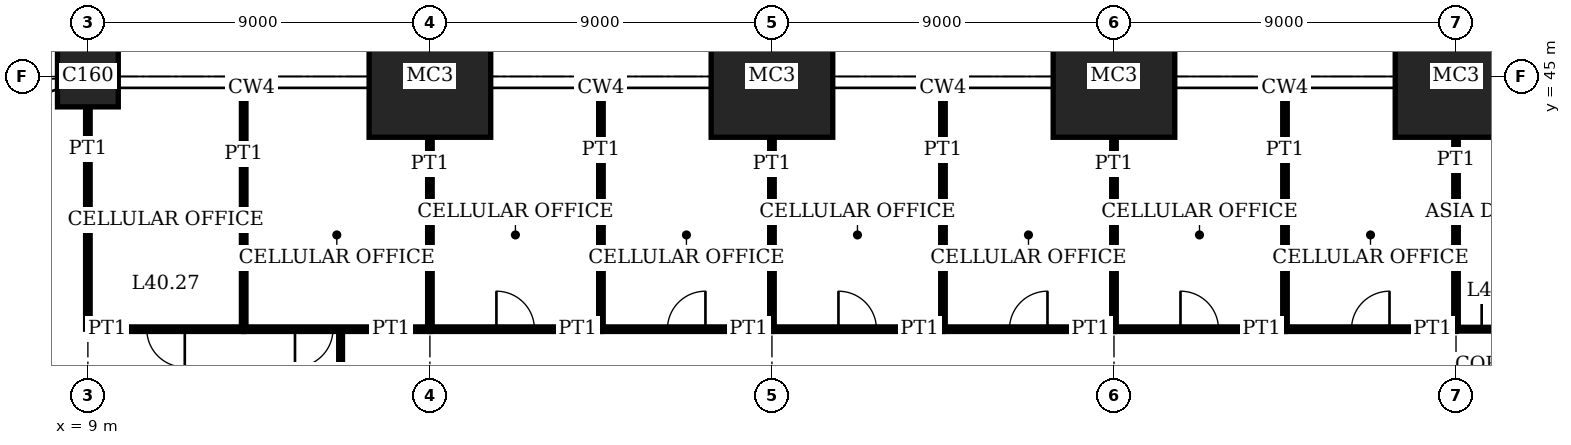
"""IFC4 building model, lengths in metres.
Left out: names, types, materials, properties, quantities, classifications, styles, units other than length and angle.
Written with IfcOpenShell. Run it as: python <this file> out.ifc"""

import sys

from ifc_helpers import new_model, si_unit, direction, frame, frame_2d, origin, origin_2d, place, context, subcontext, project, spatial, rectangle, extrude, element, fill, save


model = new_model("IFC4")
c1 = context("Model", 3, precision=1e-05, world=origin(), true_north=direction((0.0, 1.0)))
c2 = subcontext(c1, "Body", "Model", "MODEL_VIEW")
j1 = project(units=[si_unit("LENGTHUNIT", "METRE"), si_unit("PLANEANGLEUNIT", "RADIAN")], contexts=[c1])
p1 = place(None, origin())
s1 = spatial("IfcSite", under=j1, at=p1, CompositionType="ELEMENT")
p2 = place(p1, origin())
s2 = spatial("IfcBuilding", under=s1, at=p2, CompositionType="ELEMENT")
p3 = place(p2, frame((0.0, 0.0, 166.2)))
s3 = spatial("IfcBuildingStorey", under=s2, at=p3, CompositionType="ELEMENT", Elevation=166.2)
p4 = place(p3, frame((9.0, 45.0, 0.0), z_axis=(0.0, 0.0, 1.0), x_axis=(1.0, 0.0, 0.0)))
e1 = element("IfcColumn", 1, at=p4, inside=s3, PredefinedType="COLUMN", context=c2, shape_type="SweptSolid", body=[
    extrude(rectangle(XDim=1.6, YDim=1.6, at=origin_2d()), origin(), (0.0, 0.0, 1.0), 4.0),
])
for number, where, z_axis, x_axis in (
    (2, (18.0, 45.0, 0.0), (0.0, 0.0, 1.0), (1.0, 0.0, 0.0)),
    (3, (27.0, 45.0, 0.0), (0.0, 0.0, 1.0), (1.0, 0.0, 0.0)),
    (4, (36.0, 45.0, 0.0), (0.0, 0.0, 1.0), (1.0, 0.0, 0.0)),
    (5, (45.0, 45.0, 0.0), (0.0, 0.0, 1.0), (1.0, 0.0, 0.0)),
):
    element("IfcColumn", number, at=place(p3, frame(where, z_axis=z_axis, x_axis=x_axis)), inside=s3, PredefinedType="COLUMN", context=c2, shape_type="SweptSolid", body=[
        extrude(rectangle(XDim=3.2, YDim=3.2, at=origin_2d()), origin(), (0.0, 0.0, 1.0), 4.0),
    ])
p5 = place(p3, frame((9.0, 38.35, 0.0), z_axis=(0.0, 0.0, 1.0), x_axis=(1.0, 0.0, 0.0)))
e6 = element("IfcWall", 6, at=p5, inside=s3, PredefinedType="PARTITIONING", context=c2, shape_type="SweptSolid", body=[
    extrude(rectangle(XDim=4.1, YDim=0.12, at=frame_2d((2.05, 0.0))), origin(), (0.0, 0.0, 1.0), 3.75),
])
p6 = place(p5, frame((1.55, 0.0, 0.0)))
e7 = element("IfcOpeningElement", 7, at=p6, cuts=e6, PredefinedType="OPENING", context=c2, shape_type="SweptSolid", body=[
    extrude(rectangle(XDim=1.0, YDim=2.4, at=frame_2d((0.5, 1.2))), frame((0.0, 0.07, 0.0), z_axis=(0.0, -1.0, 0.0), x_axis=(1.0, 0.0, 0.0)), (0.0, 0.0, 1.0), 0.14),
])
p7 = place(p3, frame((13.1, 38.35, 0.0), z_axis=(0.0, 0.0, 1.0), x_axis=(1.0, 0.0, 0.0)))
e8 = element("IfcWall", 8, at=p7, inside=s3, PredefinedType="PARTITIONING", context=c2, shape_type="SweptSolid", body=[
    extrude(rectangle(XDim=4.9, YDim=0.12, at=frame_2d((2.45, 0.0))), origin(), (0.0, 0.0, 1.0), 3.75),
])
p8 = place(p7, frame((1.35, 0.0, 0.0)))
e9 = element("IfcOpeningElement", 9, at=p8, cuts=e8, PredefinedType="OPENING", context=c2, shape_type="SweptSolid", body=[
    extrude(rectangle(XDim=1.0, YDim=2.4, at=frame_2d((0.5, 1.2))), frame((0.0, 0.07, 0.0), z_axis=(0.0, -1.0, 0.0), x_axis=(1.0, 0.0, 0.0)), (0.0, 0.0, 1.0), 0.14),
])
p9 = place(p3, frame((18.0, 38.35, 0.0), z_axis=(0.0, 0.0, 1.0), x_axis=(1.0, 0.0, 0.0)))
e10 = element("IfcWall", 10, at=p9, inside=s3, PredefinedType="PARTITIONING", context=c2, shape_type="SweptSolid", body=[
    extrude(rectangle(XDim=4.5, YDim=0.12, at=frame_2d((2.25, 0.0))), origin(), (0.0, 0.0, 1.0), 3.75),
])
p10 = place(p9, frame((1.75, 0.0, 0.0)))
e11 = element("IfcOpeningElement", 11, at=p10, cuts=e10, PredefinedType="OPENING", context=c2, shape_type="SweptSolid", body=[
    extrude(rectangle(XDim=1.0, YDim=2.4, at=frame_2d((0.5, 1.2))), frame((0.0, 0.07, 0.0), z_axis=(0.0, -1.0, 0.0), x_axis=(1.0, 0.0, 0.0)), (0.0, 0.0, 1.0), 0.14),
])
p11 = place(p3, frame((22.5, 38.35, 0.0), z_axis=(0.0, 0.0, 1.0), x_axis=(1.0, 0.0, 0.0)))
e12 = element("IfcWall", 12, at=p11, inside=s3, PredefinedType="PARTITIONING", context=c2, shape_type="SweptSolid", body=[
    extrude(rectangle(XDim=4.5, YDim=0.12, at=frame_2d((2.25, 0.0))), origin(), (0.0, 0.0, 1.0), 3.75),
])
p12 = place(p11, frame((1.75, 0.0, 0.0)))
e13 = element("IfcOpeningElement", 13, at=p12, cuts=e12, PredefinedType="OPENING", context=c2, shape_type="SweptSolid", body=[
    extrude(rectangle(XDim=1.0, YDim=2.4, at=frame_2d((0.5, 1.2))), frame((0.0, 0.07, 0.0), z_axis=(0.0, -1.0, 0.0), x_axis=(1.0, 0.0, 0.0)), (0.0, 0.0, 1.0), 0.14),
])
p13 = place(p3, frame((27.0, 38.35, 0.0), z_axis=(0.0, 0.0, 1.0), x_axis=(1.0, 0.0, 0.0)))
e14 = element("IfcWall", 14, at=p13, inside=s3, PredefinedType="PARTITIONING", context=c2, shape_type="SweptSolid", body=[
    extrude(rectangle(XDim=4.5, YDim=0.12, at=frame_2d((2.25, 0.0))), origin(), (0.0, 0.0, 1.0), 3.75),
])
p14 = place(p13, frame((1.75, 0.0, 0.0)))
e15 = element("IfcOpeningElement", 15, at=p14, cuts=e14, PredefinedType="OPENING", context=c2, shape_type="SweptSolid", body=[
    extrude(rectangle(XDim=1.0, YDim=2.4, at=frame_2d((0.5, 1.2))), frame((0.0, 0.07, 0.0), z_axis=(0.0, -1.0, 0.0), x_axis=(1.0, 0.0, 0.0)), (0.0, 0.0, 1.0), 0.14),
])
p15 = place(p3, frame((31.5, 38.35, 0.0), z_axis=(0.0, 0.0, 1.0), x_axis=(1.0, 0.0, 0.0)))
e16 = element("IfcWall", 16, at=p15, inside=s3, PredefinedType="PARTITIONING", context=c2, shape_type="SweptSolid", body=[
    extrude(rectangle(XDim=4.5, YDim=0.12, at=frame_2d((2.25, 0.0))), origin(), (0.0, 0.0, 1.0), 3.75),
])
p16 = place(p15, frame((1.75, 0.0, 0.0)))
e17 = element("IfcOpeningElement", 17, at=p16, cuts=e16, PredefinedType="OPENING", context=c2, shape_type="SweptSolid", body=[
    extrude(rectangle(XDim=1.0, YDim=2.4, at=frame_2d((0.5, 1.2))), frame((0.0, 0.07, 0.0), z_axis=(0.0, -1.0, 0.0), x_axis=(1.0, 0.0, 0.0)), (0.0, 0.0, 1.0), 0.14),
])
p17 = place(p3, frame((36.0, 38.35, 0.0), z_axis=(0.0, 0.0, 1.0), x_axis=(1.0, 0.0, 0.0)))
e18 = element("IfcWall", 18, at=p17, inside=s3, PredefinedType="PARTITIONING", context=c2, shape_type="SweptSolid", body=[
    extrude(rectangle(XDim=4.5, YDim=0.12, at=frame_2d((2.25, 0.0))), origin(), (0.0, 0.0, 1.0), 3.75),
])
p18 = place(p17, frame((1.75, 0.0, 0.0)))
e19 = element("IfcOpeningElement", 19, at=p18, cuts=e18, PredefinedType="OPENING", context=c2, shape_type="SweptSolid", body=[
    extrude(rectangle(XDim=1.0, YDim=2.4, at=frame_2d((0.5, 1.2))), frame((0.0, 0.07, 0.0), z_axis=(0.0, -1.0, 0.0), x_axis=(1.0, 0.0, 0.0)), (0.0, 0.0, 1.0), 0.14),
])
p19 = place(p3, frame((40.5, 38.35, 0.0), z_axis=(0.0, 0.0, 1.0), x_axis=(1.0, 0.0, 0.0)))
e20 = element("IfcWall", 20, at=p19, inside=s3, PredefinedType="PARTITIONING", context=c2, shape_type="SweptSolid", body=[
    extrude(rectangle(XDim=4.5, YDim=0.12, at=frame_2d((2.25, 0.0))), origin(), (0.0, 0.0, 1.0), 3.75),
])
p20 = place(p19, frame((1.75, 0.0, 0.0)))
e21 = element("IfcOpeningElement", 21, at=p20, cuts=e20, PredefinedType="OPENING", context=c2, shape_type="SweptSolid", body=[
    extrude(rectangle(XDim=1.0, YDim=2.4, at=frame_2d((0.5, 1.2))), frame((0.0, 0.07, 0.0), z_axis=(0.0, -1.0, 0.0), x_axis=(1.0, 0.0, 0.0)), (0.0, 0.0, 1.0), 0.14),
])
p21 = place(p3, frame((45.0, 38.35, 0.0), z_axis=(0.0, 0.0, 1.0), x_axis=(1.0, 0.0, 0.0)))
e22 = element("IfcWall", 22, at=p21, inside=s3, PredefinedType="PARTITIONING", context=c2, shape_type="SweptSolid", body=[
    extrude(rectangle(XDim=2.35, YDim=0.1, at=frame_2d((1.175, 0.0))), origin(), (0.0, 0.0, 1.0), 3.75),
])
p22 = place(p21, frame((0.675, 0.0, 0.0)))
e23 = element("IfcOpeningElement", 23, at=p22, cuts=e22, PredefinedType="OPENING", context=c2, shape_type="SweptSolid", body=[
    extrude(rectangle(XDim=1.0, YDim=2.4, at=frame_2d((0.5, 1.2))), frame((0.0, 0.06, 0.0), z_axis=(0.0, -1.0, 0.0), x_axis=(1.0, 0.0, 0.0)), (0.0, 0.0, 1.0), 0.12),
])
p23 = place(p3, frame((9.0, 38.35, 0.0), z_axis=(0.0, 0.0, 1.0), x_axis=(0.0, 1.0, 0.0)))
e24 = element("IfcWall", 24, at=p23, inside=s3, PredefinedType="PARTITIONING", context=c2, shape_type="SweptSolid", body=[
    extrude(rectangle(XDim=5.85, YDim=0.12, at=frame_2d((2.925, 0.0))), origin(), (0.0, 0.0, 1.0), 3.05),
])
p24 = place(p3, frame((13.1, 38.35, 0.0), z_axis=(0.0, 0.0, 1.0), x_axis=(0.0, 1.0, 0.0)))
e25 = element("IfcWall", 25, at=p24, inside=s3, PredefinedType="PARTITIONING", context=c2, shape_type="SweptSolid", body=[
    extrude(rectangle(XDim=6.34, YDim=0.12, at=frame_2d((3.17, 0.0))), origin(), (0.0, 0.0, 1.0), 3.75),
])
p25 = place(p3, frame((15.65, 22.5, 0.0), z_axis=(0.0, 0.0, 1.0), x_axis=(0.0, 1.0, 0.0)))
e26 = element("IfcWall", 26, at=p25, inside=s3, PredefinedType="PARTITIONING", context=c2, shape_type="SweptSolid", body=[
    extrude(rectangle(XDim=15.85, YDim=0.1, at=frame_2d((7.925, 0.0))), origin(), (0.0, 0.0, 1.0), 3.75),
])
p26 = place(p25, frame((7.425, 0.0, 0.0)))
e27 = element("IfcOpeningElement", 27, at=p26, cuts=e26, PredefinedType="OPENING", context=c2, shape_type="SweptSolid", body=[
    extrude(rectangle(XDim=1.0, YDim=2.4, at=frame_2d((0.5, 1.2))), frame((0.0, 0.06, 0.0), z_axis=(0.0, -1.0, 0.0), x_axis=(1.0, 0.0, 0.0)), (0.0, 0.0, 1.0), 0.12),
])
p27 = place(p3, frame((18.0, 38.35, 0.0), z_axis=(0.0, 0.0, 1.0), x_axis=(0.0, 1.0, 0.0)))
e28 = element("IfcWall", 28, at=p27, inside=s3, PredefinedType="PARTITIONING", context=c2, shape_type="SweptSolid", body=[
    extrude(rectangle(XDim=5.05, YDim=0.12, at=frame_2d((2.525, 0.0))), origin(), (0.0, 0.0, 1.0), 3.05),
])
p28 = place(p3, frame((22.5, 38.35, 0.0), z_axis=(0.0, 0.0, 1.0), x_axis=(0.0, 1.0, 0.0)))
e29 = element("IfcWall", 29, at=p28, inside=s3, PredefinedType="PARTITIONING", context=c2, shape_type="SweptSolid", body=[
    extrude(rectangle(XDim=6.34, YDim=0.12, at=frame_2d((3.17, 0.0))), origin(), (0.0, 0.0, 1.0), 3.75),
])
p29 = place(p3, frame((27.0, 38.35, 0.0), z_axis=(0.0, 0.0, 1.0), x_axis=(0.0, 1.0, 0.0)))
e30 = element("IfcWall", 30, at=p29, inside=s3, PredefinedType="PARTITIONING", context=c2, shape_type="SweptSolid", body=[
    extrude(rectangle(XDim=5.05, YDim=0.12, at=frame_2d((2.525, 0.0))), origin(), (0.0, 0.0, 1.0), 3.05),
])
p30 = place(p3, frame((31.5, 38.35, 0.0), z_axis=(0.0, 0.0, 1.0), x_axis=(0.0, 1.0, 0.0)))
e31 = element("IfcWall", 31, at=p30, inside=s3, PredefinedType="PARTITIONING", context=c2, shape_type="SweptSolid", body=[
    extrude(rectangle(XDim=6.34, YDim=0.12, at=frame_2d((3.17, 0.0))), origin(), (0.0, 0.0, 1.0), 3.75),
])
p31 = place(p3, frame((36.0, 38.35, 0.0), z_axis=(0.0, 0.0, 1.0), x_axis=(0.0, 1.0, 0.0)))
e32 = element("IfcWall", 32, at=p31, inside=s3, PredefinedType="PARTITIONING", context=c2, shape_type="SweptSolid", body=[
    extrude(rectangle(XDim=5.05, YDim=0.12, at=frame_2d((2.525, 0.0))), origin(), (0.0, 0.0, 1.0), 3.05),
])
p32 = place(p3, frame((40.5, 38.35, 0.0), z_axis=(0.0, 0.0, 1.0), x_axis=(0.0, 1.0, 0.0)))
e33 = element("IfcWall", 33, at=p32, inside=s3, PredefinedType="PARTITIONING", context=c2, shape_type="SweptSolid", body=[
    extrude(rectangle(XDim=6.34, YDim=0.12, at=frame_2d((3.17, 0.0))), origin(), (0.0, 0.0, 1.0), 3.75),
])
p33 = place(p3, frame((45.0, 38.35, 0.0), z_axis=(0.0, 0.0, 1.0), x_axis=(0.0, 1.0, 0.0)))
e34 = element("IfcWall", 34, at=p33, inside=s3, PredefinedType="PARTITIONING", context=c2, shape_type="SweptSolid", body=[
    extrude(rectangle(XDim=5.05, YDim=0.12, at=frame_2d((2.525, 0.0))), origin(), (0.0, 0.0, 1.0), 3.05),
])
p34 = place(p6, origin())
e35 = element("IfcDoor", 35, at=p34, inside=s3, OperationType="SINGLE_SWING_RIGHT", PredefinedType="DOOR", context=c2, shape_type="SweptSolid", body=[
    extrude(rectangle(XDim=1.0, YDim=2.4, at=frame_2d((0.5, 1.2))), frame((0.0, 0.025, 0.0), z_axis=(0.0, -1.0, 0.0), x_axis=(1.0, 0.0, 0.0)), (0.0, 0.0, 1.0), 0.05),
])
fill(e7, e35)
p35 = place(p8, origin())
e36 = element("IfcDoor", 36, at=p35, inside=s3, OperationType="SINGLE_SWING_LEFT", PredefinedType="DOOR", context=c2, shape_type="SweptSolid", body=[
    extrude(rectangle(XDim=1.0, YDim=2.4, at=frame_2d((0.5, 1.2))), frame((0.0, 0.025, 0.0), z_axis=(0.0, -1.0, 0.0), x_axis=(1.0, 0.0, 0.0)), (0.0, 0.0, 1.0), 0.05),
])
fill(e9, e36)
p36 = place(p10, origin())
e37 = element("IfcDoor", 37, at=p36, inside=s3, OperationType="SINGLE_SWING_RIGHT", PredefinedType="DOOR", context=c2, shape_type="SweptSolid", body=[
    extrude(rectangle(XDim=1.0, YDim=2.4, at=frame_2d((0.5, 1.2))), frame((0.0, 0.025, 0.0), z_axis=(0.0, -1.0, 0.0), x_axis=(1.0, 0.0, 0.0)), (0.0, 0.0, 1.0), 0.05),
])
fill(e11, e37)
p37 = place(p12, origin())
e38 = element("IfcDoor", 38, at=p37, inside=s3, OperationType="SINGLE_SWING_LEFT", PredefinedType="DOOR", context=c2, shape_type="SweptSolid", body=[
    extrude(rectangle(XDim=1.0, YDim=2.4, at=frame_2d((0.5, 1.2))), frame((0.0, 0.025, 0.0), z_axis=(0.0, -1.0, 0.0), x_axis=(1.0, 0.0, 0.0)), (0.0, 0.0, 1.0), 0.05),
])
fill(e13, e38)
p38 = place(p14, origin())
e39 = element("IfcDoor", 39, at=p38, inside=s3, OperationType="SINGLE_SWING_RIGHT", PredefinedType="DOOR", context=c2, shape_type="SweptSolid", body=[
    extrude(rectangle(XDim=1.0, YDim=2.4, at=frame_2d((0.5, 1.2))), frame((0.0, 0.025, 0.0), z_axis=(0.0, -1.0, 0.0), x_axis=(1.0, 0.0, 0.0)), (0.0, 0.0, 1.0), 0.05),
])
fill(e15, e39)
p39 = place(p16, origin())
e40 = element("IfcDoor", 40, at=p39, inside=s3, OperationType="SINGLE_SWING_LEFT", PredefinedType="DOOR", context=c2, shape_type="SweptSolid", body=[
    extrude(rectangle(XDim=1.0, YDim=2.4, at=frame_2d((0.5, 1.2))), frame((0.0, 0.025, 0.0), z_axis=(0.0, -1.0, 0.0), x_axis=(1.0, 0.0, 0.0)), (0.0, 0.0, 1.0), 0.05),
])
fill(e17, e40)
p40 = place(p18, origin())
e41 = element("IfcDoor", 41, at=p40, inside=s3, OperationType="SINGLE_SWING_RIGHT", PredefinedType="DOOR", context=c2, shape_type="SweptSolid", body=[
    extrude(rectangle(XDim=1.0, YDim=2.4, at=frame_2d((0.5, 1.2))), frame((0.0, 0.025, 0.0), z_axis=(0.0, -1.0, 0.0), x_axis=(1.0, 0.0, 0.0)), (0.0, 0.0, 1.0), 0.05),
])
fill(e19, e41)
p41 = place(p20, origin())
e42 = element("IfcDoor", 42, at=p41, inside=s3, OperationType="SINGLE_SWING_LEFT", PredefinedType="DOOR", context=c2, shape_type="SweptSolid", body=[
    extrude(rectangle(XDim=1.0, YDim=2.4, at=frame_2d((0.5, 1.2))), frame((0.0, 0.025, 0.0), z_axis=(0.0, -1.0, 0.0), x_axis=(1.0, 0.0, 0.0)), (0.0, 0.0, 1.0), 0.05),
])
fill(e21, e42)
p42 = place(p22, origin())
e43 = element("IfcDoor", 43, at=p42, inside=s3, OperationType="SINGLE_SWING_RIGHT", PredefinedType="DOOR", context=c2, shape_type="SweptSolid", body=[
    extrude(rectangle(XDim=1.0, YDim=2.4, at=frame_2d((0.5, 1.2))), frame((0.0, 0.02, 0.0), z_axis=(0.0, -1.0, 0.0), x_axis=(1.0, 0.0, 0.0)), (0.0, 0.0, 1.0), 0.04),
])
fill(e23, e43)
save(model, sys.argv[1])
